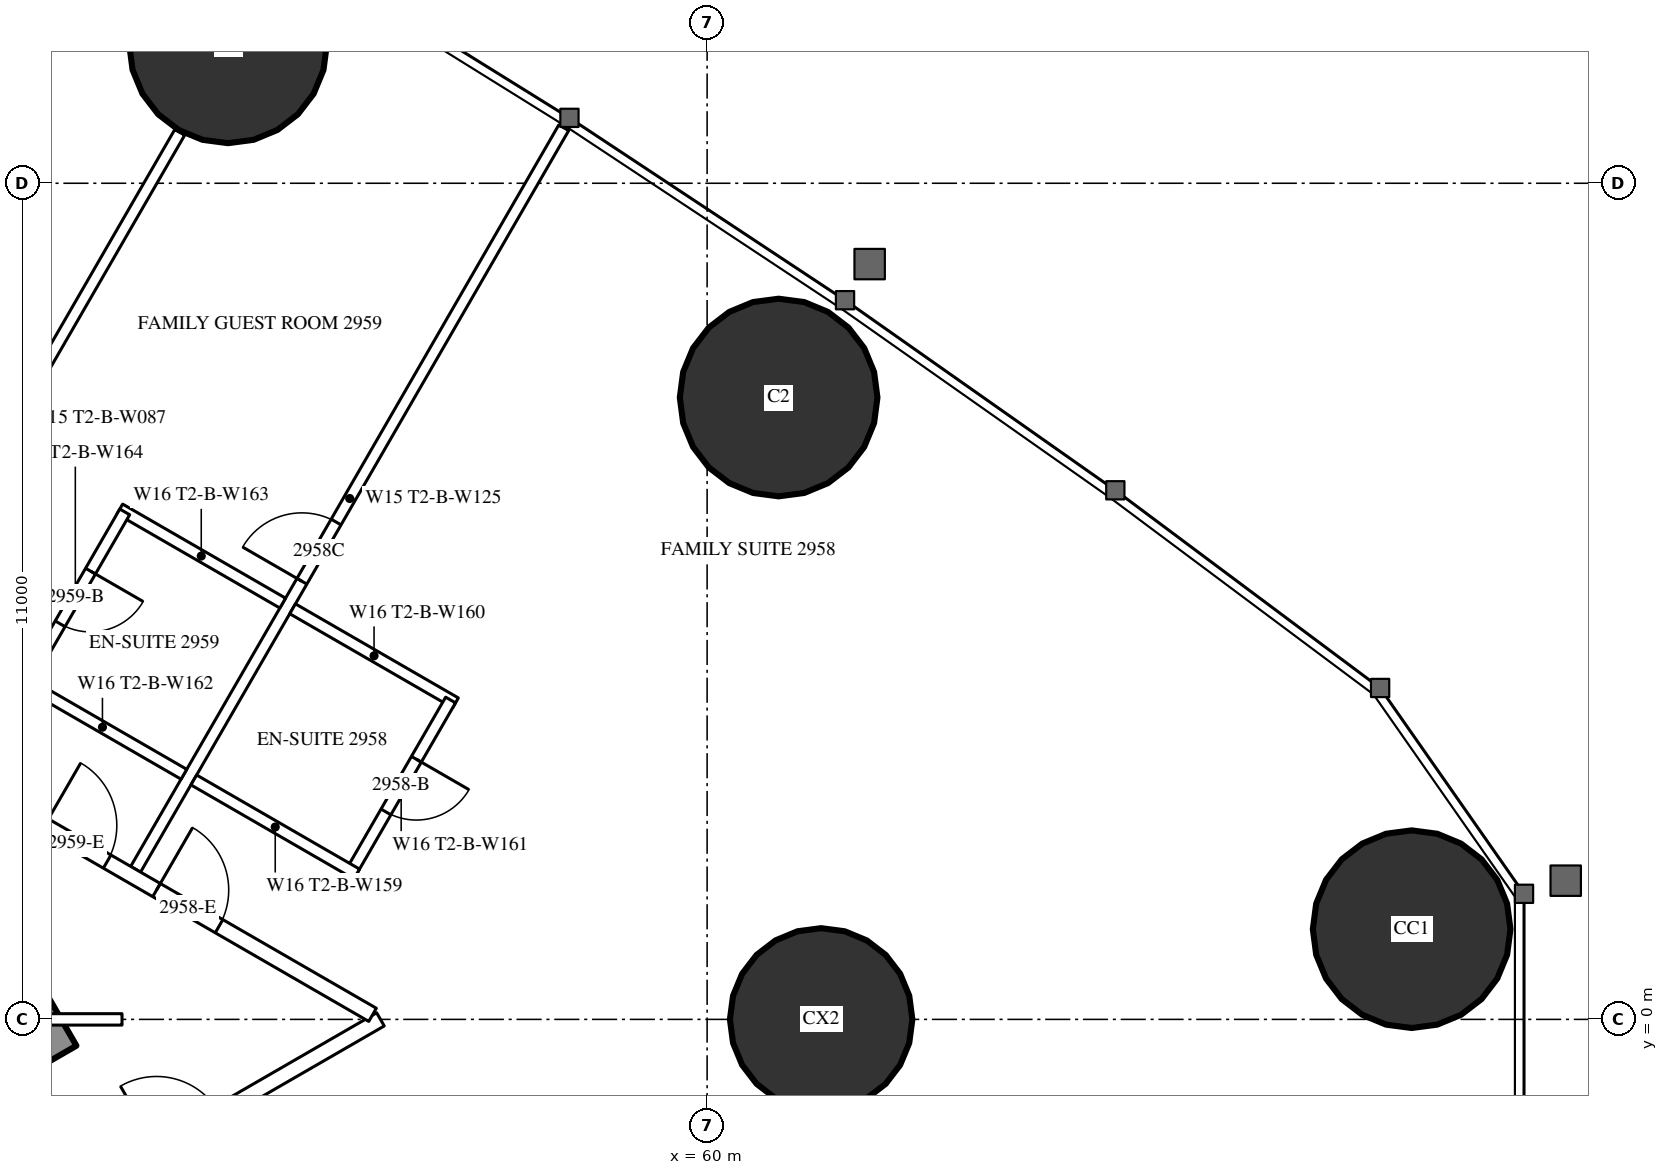
"""IFC4 building model, lengths in metres.
Left out: names, types, materials, properties, quantities, classifications, styles, units other than length and angle.
Written with IfcOpenShell. Run it as: python <this file> out.ifc"""

import sys

from ifc_helpers import new_model, si_unit, direction, frame, frame_2d, origin, origin_2d, place, context, subcontext, project, spatial, rectangle, circle, hollow_circle, extrude, element, fill, save


model = new_model("IFC4")
c1 = context("Model", 3, precision=1e-05, world=origin(), true_north=direction((0.0, 1.0)))
c2 = subcontext(c1, "Body", "Model", "MODEL_VIEW")
j1 = project(units=[si_unit("LENGTHUNIT", "METRE"), si_unit("PLANEANGLEUNIT", "RADIAN")], contexts=[c1])
p1 = place(None, origin())
s1 = spatial("IfcSite", under=j1, at=p1, CompositionType="ELEMENT")
p2 = place(p1, origin())
s2 = spatial("IfcBuilding", under=s1, at=p2, CompositionType="ELEMENT")
p3 = place(p2, frame((0.0, 0.0, 111.6)))
s3 = spatial("IfcBuildingStorey", under=s2, at=p3, CompositionType="ELEMENT", Elevation=111.6)
for number, where, z_axis, x_axis in (
    (1, (69.269, 1.187, 0.0), (0.0, 0.0, 1.0), (1.0, 0.0, 0.0)),
    (2, (60.941, 8.181, 0.0), (0.0, 0.0, 1.0), (1.0, 0.0, 0.0)),
    (3, (53.697, 12.827, 0.0), (0.0, 0.0, 1.0), (1.0, 0.0, 0.0)),
):
    element("IfcColumn", number, at=place(p3, frame(where, z_axis=z_axis, x_axis=x_axis)), inside=s3, PredefinedType="COLUMN", context=c2, shape_type="SweptSolid", body=[
        extrude(hollow_circle(Radius=1.3, WallThickness=0.1, at=origin_2d()), origin(), (0.0, 0.0, 1.0), 3.5),
    ])
p4 = place(p3, frame((61.5, 0.0, 0.0), z_axis=(0.0, 0.0, 1.0), x_axis=(1.0, 0.0, 0.0)))
e4 = element("IfcColumn", 4, at=p4, inside=s3, PredefinedType="COLUMN", context=c2, shape_type="SweptSolid", body=[
    extrude(circle(Radius=1.2, at=origin_2d()), origin(), (0.0, 0.0, 1.0), 3.5),
])
p5 = place(p3, frame((27.2, -13.8, 0.0), z_axis=(0.0, 0.0, 1.0), x_axis=(0.866027159892, 0.499996958321, 0.0)))
e5 = element("IfcWall", 5, at=p5, inside=s3, PredefinedType="SHEAR", context=c2, shape_type="SweptSolid", body=[
    extrude(rectangle(XDim=27.947, YDim=1.2, at=frame_2d((13.973, 0.0))), origin(), (0.0, 0.0, 1.0), 3.5),
])
p6 = place(p5, frame((4.6, 0.0, 0.0)))
e6 = element("IfcOpeningElement", 6, at=p6, cuts=e5, PredefinedType="OPENING", context=c2, shape_type="SweptSolid", body=[
    extrude(rectangle(XDim=1.0, YDim=2.2, at=frame_2d((0.5, 1.1))), frame((0.0, 0.61, 0.0), z_axis=(0.0, -1.0, 0.0), x_axis=(1.0, 0.0, 0.0)), (0.0, 0.0, 1.0), 1.22),
])
p7 = place(p5, frame((13.395, 0.0, 0.0)))
e7 = element("IfcOpeningElement", 7, at=p7, cuts=e5, PredefinedType="OPENING", context=c2, shape_type="SweptSolid", body=[
    extrude(rectangle(XDim=1.8, YDim=2.2, at=frame_2d((0.9, 1.1))), frame((0.0, 0.61, 0.0), z_axis=(0.0, -1.0, 0.0), x_axis=(1.0, 0.0, 0.0)), (0.0, 0.0, 1.0), 1.22),
])
p8 = place(p3, frame((48.719, 4.147, 0.0), z_axis=(0.0, 0.0, 1.0), x_axis=(0.499993328235, 0.866029255696, 0.0)))
e8 = element("IfcWall", 8, at=p8, inside=s3, PredefinedType="PARTITIONING", context=c2, shape_type="SweptSolid", body=[
    extrude(rectangle(XDim=8.686, YDim=0.15, at=frame_2d((4.343, 0.0))), origin(), (0.0, 0.0, 1.0), 2.2),
])
p9 = place(p3, frame((52.481, 1.975, 0.0), z_axis=(0.0, 0.0, 1.0), x_axis=(0.500003867771, 0.866023170714, 0.0)))
e9 = element("IfcWall", 9, at=p9, inside=s3, PredefinedType="PARTITIONING", context=c2, shape_type="SweptSolid", body=[
    extrude(rectangle(XDim=11.265, YDim=0.15, at=frame_2d((5.632, 0.0))), origin(), (0.0, 0.0, 1.0), 3.25),
])
p10 = place(p9, frame((4.375, 0.0, 0.0)))
e10 = element("IfcOpeningElement", 10, at=p10, cuts=e9, PredefinedType="OPENING", context=c2, shape_type="SweptSolid", body=[
    extrude(rectangle(XDim=0.9, YDim=2.2, at=frame_2d((0.45, 1.1))), frame((0.0, 0.085, 0.0), z_axis=(0.0, -1.0, 0.0), x_axis=(1.0, 0.0, 0.0)), (0.0, 0.0, 1.0), 0.17),
])
p11 = place(p3, frame((37.96, -10.243, 0.0), z_axis=(0.0, 0.0, 1.0), x_axis=(0.866026429433, 0.499998223521, 0.0)))
e11 = element("IfcWall", 11, at=p11, inside=s3, PredefinedType="PARTITIONING", context=c2, shape_type="SweptSolid", body=[
    extrude(rectangle(XDim=20.487, YDim=0.2, at=frame_2d((10.243, 0.0))), origin(), (0.0, 0.0, 1.0), 3.25),
])
p12 = place(p11, frame((4.343, 0.0, 0.0)))
e12 = element("IfcOpeningElement", 12, at=p12, cuts=e11, PredefinedType="OPENING", context=c2, shape_type="SweptSolid", body=[
    extrude(rectangle(XDim=0.95, YDim=2.2, at=frame_2d((0.475, 1.1))), frame((0.0, 0.11, 0.0), z_axis=(0.0, -1.0, 0.0), x_axis=(1.0, 0.0, 0.0)), (0.0, 0.0, 1.0), 0.22),
])
p13 = place(p11, frame((15.385, 0.0, 0.0)))
e13 = element("IfcOpeningElement", 13, at=p13, cuts=e11, PredefinedType="OPENING", context=c2, shape_type="SweptSolid", body=[
    extrude(rectangle(XDim=0.95, YDim=2.2, at=frame_2d((0.475, 1.1))), frame((0.0, 0.11, 0.0), z_axis=(0.0, -1.0, 0.0), x_axis=(1.0, 0.0, 0.0)), (0.0, 0.0, 1.0), 0.22),
])
p14 = place(p11, frame((17.085, 0.0, 0.0)))
e14 = element("IfcOpeningElement", 14, at=p14, cuts=e11, PredefinedType="OPENING", context=c2, shape_type="SweptSolid", body=[
    extrude(rectangle(XDim=0.95, YDim=2.2, at=frame_2d((0.475, 1.1))), frame((0.0, 0.11, 0.0), z_axis=(0.0, -1.0, 0.0), x_axis=(1.0, 0.0, 0.0)), (0.0, 0.0, 1.0), 0.22),
])
p15 = place(p11, frame((1.048, 0.0, 0.0)))
e15 = element("IfcOpeningElement", 15, at=p15, cuts=e11, PredefinedType="OPENING", context=c2, shape_type="SweptSolid", body=[
    extrude(rectangle(XDim=1.8, YDim=2.2, at=frame_2d((0.9, 1.1))), frame((0.0, 0.11, 0.0), z_axis=(0.0, -1.0, 0.0), x_axis=(1.0, 0.0, 0.0)), (0.0, 0.0, 1.0), 0.22),
])
p16 = place(p3, frame((44.925, 6.222, 0.0), z_axis=(0.0, 0.0, 1.0), x_axis=(0.866025590081, -0.499999677325, 0.0)))
e16 = element("IfcWall", 16, at=p16, inside=s3, PredefinedType="PARTITIONING", context=c2, shape_type="SweptSolid", body=[
    extrude(rectangle(XDim=12.324, YDim=0.2, at=frame_2d((6.162, 0.0))), origin(), (0.0, 0.0, 1.0), 3.25),
])
p17 = place(p16, frame((9.042, 0.0, 0.0)))
e17 = element("IfcOpeningElement", 17, at=p17, cuts=e16, PredefinedType="OPENING", context=c2, shape_type="SweptSolid", body=[
    extrude(rectangle(XDim=0.95, YDim=2.2, at=frame_2d((0.475, 1.1))), frame((0.0, 0.11, 0.0), z_axis=(0.0, -1.0, 0.0), x_axis=(1.0, 0.0, 0.0)), (0.0, 0.0, 1.0), 0.22),
])
p18 = place(p16, frame((7.342, 0.0, 0.0)))
e18 = element("IfcOpeningElement", 18, at=p18, cuts=e16, PredefinedType="OPENING", context=c2, shape_type="SweptSolid", body=[
    extrude(rectangle(XDim=0.95, YDim=2.2, at=frame_2d((0.475, 1.1))), frame((0.0, 0.11, 0.0), z_axis=(0.0, -1.0, 0.0), x_axis=(1.0, 0.0, 0.0)), (0.0, 0.0, 1.0), 0.22),
])
p19 = place(p16, frame((0.6, 0.0, 0.0)))
e19 = element("IfcOpeningElement", 19, at=p19, cuts=e16, PredefinedType="OPENING", context=c2, shape_type="SweptSolid", body=[
    extrude(rectangle(XDim=0.95, YDim=2.2, at=frame_2d((0.475, 1.1))), frame((0.0, 0.11, 0.0), z_axis=(0.0, -1.0, 0.0), x_axis=(1.0, 0.0, 0.0)), (0.0, 0.0, 1.0), 0.22),
])
p20 = place(p3, frame((54.546, 5.402, 0.0), z_axis=(0.0, 0.0, 1.0), x_axis=(0.866006523861, -0.500032699561, 0.0)))
e20 = element("IfcWall", 20, at=p20, inside=s3, PredefinedType="PARTITIONING", context=c2, shape_type="SweptSolid", body=[
    extrude(rectangle(XDim=2.475, YDim=0.15, at=frame_2d((1.237, 0.0))), origin(), (0.0, 0.0, 1.0), 3.25),
])
p21 = place(p3, frame((55.325, 1.95, 0.0), z_axis=(0.0, 0.0, 1.0), x_axis=(0.500006934395, 0.866021400173, 0.0)))
e21 = element("IfcWall", 21, at=p21, inside=s3, PredefinedType="PARTITIONING", context=c2, shape_type="SweptSolid", body=[
    extrude(rectangle(XDim=2.6, YDim=0.15, at=frame_2d((1.3, 0.0))), origin(), (0.0, 0.0, 1.0), 3.25),
])
p22 = place(p21, frame((0.9, 0.0, 0.0)))
e22 = element("IfcOpeningElement", 22, at=p22, cuts=e21, PredefinedType="OPENING", context=c2, shape_type="SweptSolid", body=[
    extrude(rectangle(XDim=0.8, YDim=2.2, at=frame_2d((0.4, 1.1))), frame((0.0, 0.085, 0.0), z_axis=(0.0, -1.0, 0.0), x_axis=(1.0, 0.0, 0.0)), (0.0, 0.0, 1.0), 0.17),
])
p23 = place(p3, frame((53.246, 3.15, 0.0), z_axis=(0.0, 0.0, 1.0), x_axis=(0.866006523861, -0.500032699561, 0.0)))
e23 = element("IfcWall", 23, at=p23, inside=s3, PredefinedType="PARTITIONING", context=c2, shape_type="SweptSolid", body=[
    extrude(rectangle(XDim=2.475, YDim=0.15, at=frame_2d((1.237, 0.0))), origin(), (0.0, 0.0, 1.0), 3.25),
])
p24 = place(p3, frame((52.273, 6.714, 0.0), z_axis=(0.0, 0.0, 1.0), x_axis=(0.866031185235, -0.4999899861, 0.0)))
e24 = element("IfcWall", 24, at=p24, inside=s3, PredefinedType="PARTITIONING", context=c2, shape_type="SweptSolid", body=[
    extrude(rectangle(XDim=2.475, YDim=0.15, at=frame_2d((1.238, 0.0))), origin(), (0.0, 0.0, 1.0), 3.25),
])
p25 = place(p3, frame((51.038, 4.425, 0.0), z_axis=(0.0, 0.0, 1.0), x_axis=(0.49997716683, 0.86603858612, 0.0)))
e25 = element("IfcWall", 25, at=p25, inside=s3, PredefinedType="PARTITIONING", context=c2, shape_type="SweptSolid", body=[
    extrude(rectangle(XDim=2.6, YDim=0.15, at=frame_2d((1.3, 0.0))), origin(), (0.0, 0.0, 1.0), 3.25),
])
p26 = place(p25, frame((0.9, 0.0, 0.0)))
e26 = element("IfcOpeningElement", 26, at=p26, cuts=e25, PredefinedType="OPENING", context=c2, shape_type="SweptSolid", body=[
    extrude(rectangle(XDim=0.8, YDim=2.2, at=frame_2d((0.4, 1.1))), frame((0.0, 0.085, 0.0), z_axis=(0.0, -1.0, 0.0), x_axis=(1.0, 0.0, 0.0)), (0.0, 0.0, 1.0), 0.17),
])
p27 = place(p3, frame((50.973, 4.462, 0.0), z_axis=(0.0, 0.0, 1.0), x_axis=(0.866031185235, -0.4999899861, 0.0)))
e27 = element("IfcWall", 27, at=p27, inside=s3, PredefinedType="PARTITIONING", context=c2, shape_type="SweptSolid", body=[
    extrude(rectangle(XDim=2.475, YDim=0.15, at=frame_2d((1.238, 0.0))), origin(), (0.0, 0.0, 1.0), 3.25),
])
p28 = place(p3, frame((44.575, 0.0, 0.0), z_axis=(0.0, 0.0, 1.0), x_axis=(1.0, 0.0, 0.0)))
e28 = element("IfcWall", 28, at=p28, inside=s3, PredefinedType="PARTITIONING", context=c2, shape_type="SweptSolid", body=[
    extrude(rectangle(XDim=7.727, YDim=0.15, at=frame_2d((3.864, 0.0))), origin(), (0.0, 0.0, 1.0), 2.2),
])
p29 = place(p22, origin())
e29 = element("IfcDoor", 29, at=p29, inside=s3, OperationType="SINGLE_SWING_RIGHT", PredefinedType="DOOR", context=c2, shape_type="SweptSolid", body=[
    extrude(rectangle(XDim=0.8, YDim=2.2, at=frame_2d((0.4, 1.1))), frame((0.0, 0.025, 0.0), z_axis=(0.0, -1.0, 0.0), x_axis=(1.0, 0.0, 0.0)), (0.0, 0.0, 1.0), 0.05),
])
fill(e22, e29)
p30 = place(p17, origin())
e30 = element("IfcDoor", 30, at=p30, inside=s3, OperationType="SINGLE_SWING_LEFT", PredefinedType="DOOR", context=c2, shape_type="SweptSolid", body=[
    extrude(rectangle(XDim=0.95, YDim=2.2, at=frame_2d((0.475, 1.1))), frame((0.0, 0.025, 0.0), z_axis=(0.0, -1.0, 0.0), x_axis=(1.0, 0.0, 0.0)), (0.0, 0.0, 1.0), 0.05),
])
fill(e17, e30)
p31 = place(p26, origin())
e31 = element("IfcDoor", 31, at=p31, inside=s3, OperationType="SINGLE_SWING_RIGHT", PredefinedType="DOOR", context=c2, shape_type="SweptSolid", body=[
    extrude(rectangle(XDim=0.8, YDim=2.2, at=frame_2d((0.4, 1.1))), frame((0.0, 0.025, 0.0), z_axis=(0.0, -1.0, 0.0), x_axis=(1.0, 0.0, 0.0)), (0.0, 0.0, 1.0), 0.05),
])
fill(e26, e31)
p32 = place(p18, origin())
e32 = element("IfcDoor", 32, at=p32, inside=s3, OperationType="SINGLE_SWING_LEFT", PredefinedType="DOOR", context=c2, shape_type="SweptSolid", body=[
    extrude(rectangle(XDim=0.95, YDim=2.2, at=frame_2d((0.475, 1.1))), frame((0.0, 0.025, 0.0), z_axis=(0.0, -1.0, 0.0), x_axis=(1.0, 0.0, 0.0)), (0.0, 0.0, 1.0), 0.05),
])
fill(e18, e32)
p33 = place(p10, origin())
e33 = element("IfcDoor", 33, at=p33, inside=s3, OperationType="SINGLE_SWING_LEFT", PredefinedType="DOOR", context=c2, shape_type="SweptSolid", body=[
    extrude(rectangle(XDim=0.9, YDim=2.2, at=frame_2d((0.45, 1.1))), frame((0.0, 0.025, 0.0), z_axis=(0.0, -1.0, 0.0), x_axis=(1.0, 0.0, 0.0)), (0.0, 0.0, 1.0), 0.05),
])
fill(e10, e33)
save(model, sys.argv[1])
